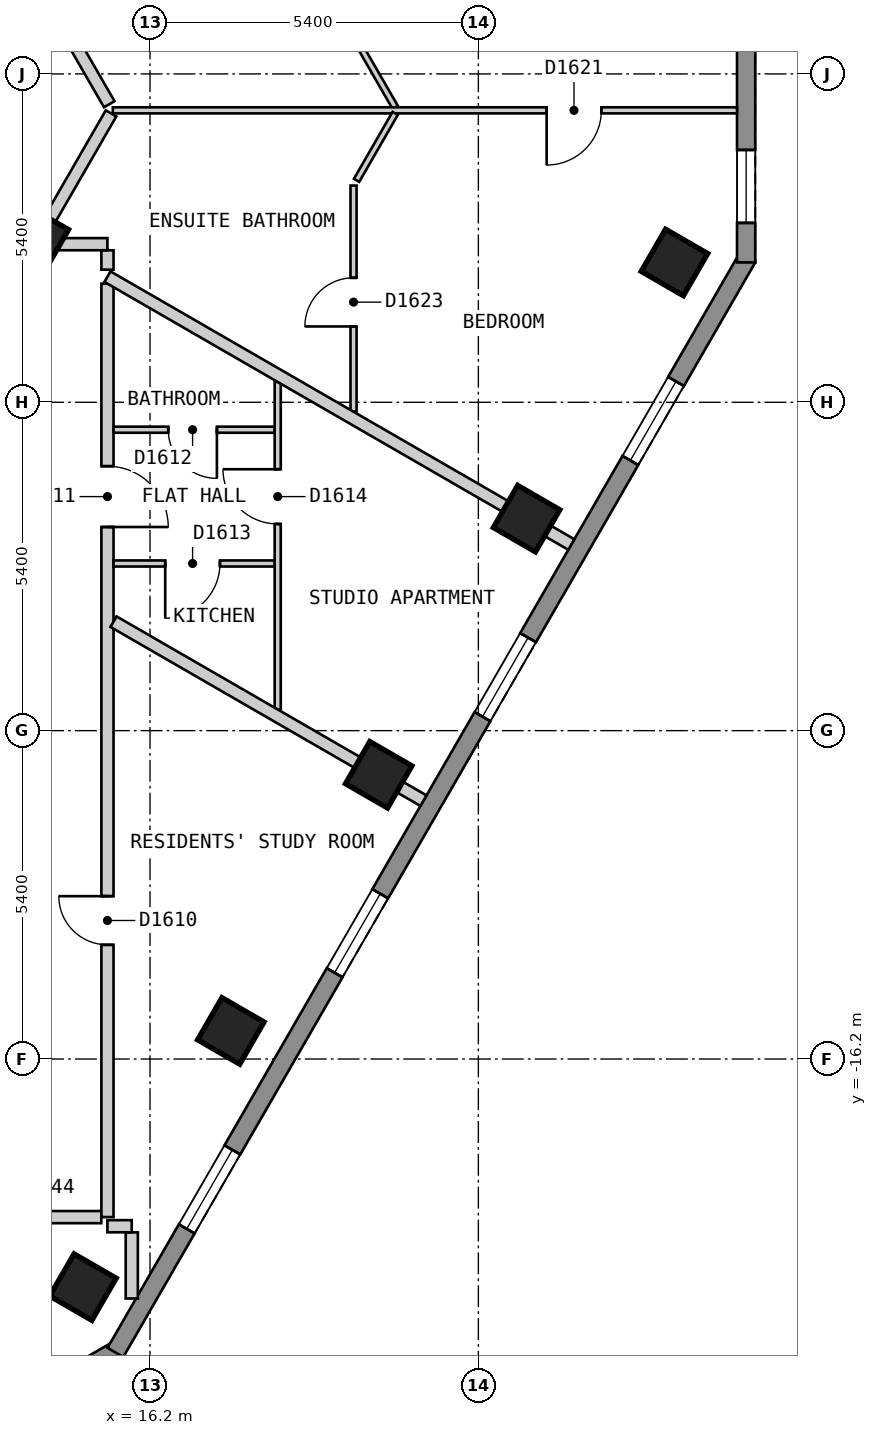
"""IFC4 building model, lengths in metres.
Left out: names, types, materials, properties, quantities, classifications, styles, units other than length and angle.
Written with IfcOpenShell. Run it as: python <this file> out.ifc"""

import sys

from ifc_helpers import new_model, si_unit, direction, frame, frame_2d, origin, origin_2d, place, context, subcontext, project, spatial, polyline, rectangle, outline, extrude, element, fill, save


model = new_model("IFC4")
c1 = context("Model", 3, precision=1e-05, world=origin(), true_north=direction((0.0, 1.0)))
c2 = subcontext(c1, "Body", "Model", "MODEL_VIEW")
j1 = project(units=[si_unit("LENGTHUNIT", "METRE"), si_unit("PLANEANGLEUNIT", "RADIAN")], contexts=[c1])
p1 = place(None, origin())
s1 = spatial("IfcSite", under=j1, at=p1, CompositionType="ELEMENT")
p2 = place(p1, origin())
s2 = spatial("IfcBuilding", under=s1, at=p2, CompositionType="ELEMENT")
p3 = place(p2, frame((0.0, 0.0, 163.2)))
s3 = spatial("IfcBuildingStorey", under=s2, at=p3, CompositionType="ELEMENT", Elevation=163.2)
for number, where, z_axis, x_axis in (
    (1, (15.097, -19.951, 0.0), (0.0, 0.0, 1.0), (0.5, 0.866, 0.0)),
    (2, (17.529, -15.738, 0.0), (0.0, 0.0, 1.0), (0.5, 0.866, 0.0)),
    (3, (19.961, -11.526, 0.0), (0.0, 0.0, 1.0), (0.5, 0.866, 0.0)),
    (4, (22.393, -7.314, 0.0), (0.0, 0.0, 1.0), (0.5, 0.866, 0.0)),
    (5, (24.825, -3.101, 0.0), (0.0, 0.0, 1.0), (0.5, 0.866, 0.0)),
):
    element("IfcColumn", number, at=place(p3, frame(where, z_axis=z_axis, x_axis=x_axis)), inside=s3, PredefinedType="COLUMN", context=c2, shape_type="SweptSolid", body=[
        extrude(rectangle(XDim=0.8, YDim=0.8, at=origin_2d()), origin(), (0.0, 0.0, 1.0), 3.0),
    ])
p4 = place(p3, frame((14.382, -2.689, 0.0), z_axis=(0.0, 0.0, 1.0), x_axis=(0.5, 0.866025403784, 0.0)))
e6 = element("IfcColumn", 6, at=p4, inside=s3, PredefinedType="COLUMN", context=c2, shape_type="SweptSolid", body=[
    extrude(rectangle(XDim=0.7, YDim=0.7, at=origin_2d()), origin(), (0.0, 0.0, 1.0), 3.0),
])
p5 = place(p3, frame((11.356, -23.47, 0.0), z_axis=(0.0, 0.0, 1.0), x_axis=(0.866022959057, 0.500004234368, 0.0)))
e7 = element("IfcWall", 7, at=p5, inside=s3, PredefinedType="SOLIDWALL", context=c2, shape_type="SweptSolid", body=[
    extrude(outline(polyline([(0.0, -0.15), (5.0, -0.15), (4.92, 0.15), (0.08, 0.15), (0.0, -0.15)])), origin(), (0.0, 0.0, 1.0), 2.7),
])
p6 = place(p5, frame((0.65, 0.0, 0.15)))
e8 = element("IfcOpeningElement", 8, at=p6, cuts=e7, PredefinedType="OPENING", context=c2, shape_type="SweptSolid", body=[
    extrude(rectangle(XDim=1.2, YDim=2.1, at=frame_2d((0.6, 1.05))), frame((0.0, 0.16, 0.0), z_axis=(0.0, -1.0, 0.0), x_axis=(1.0, 0.0, 0.0)), (0.0, 0.0, 1.0), 0.32),
])
p7 = place(p3, frame((15.631, -21.025, 0.0), z_axis=(0.0, 0.0, 1.0), x_axis=(0.500018670445, 0.86601462413, 0.0)))
e9 = element("IfcWall", 9, at=p7, inside=s3, PredefinedType="SOLIDWALL", context=c2, shape_type="SweptSolid", body=[
    extrude(outline(polyline([(0.0, -0.15), (20.785, -0.15), (20.705, 0.15), (0.08, 0.15), (0.0, -0.15)])), origin(), (0.0, 0.0, 1.0), 2.7),
])
p8 = place(p7, frame((2.346, 0.0, 0.15)))
e10 = element("IfcOpeningElement", 10, at=p8, cuts=e9, PredefinedType="OPENING", context=c2, shape_type="SweptSolid", body=[
    extrude(rectangle(XDim=1.5, YDim=2.1, at=frame_2d((0.75, 1.05))), frame((0.0, 0.16, 0.0), z_axis=(0.0, -1.0, 0.0), x_axis=(1.0, 0.0, 0.0)), (0.0, 0.0, 1.0), 0.32),
])
p9 = place(p7, frame((7.21, 0.0, 0.15)))
e11 = element("IfcOpeningElement", 11, at=p9, cuts=e9, PredefinedType="OPENING", context=c2, shape_type="SweptSolid", body=[
    extrude(rectangle(XDim=1.5, YDim=2.1, at=frame_2d((0.75, 1.05))), frame((0.0, 0.16, 0.0), z_axis=(0.0, -1.0, 0.0), x_axis=(1.0, 0.0, 0.0)), (0.0, 0.0, 1.0), 0.32),
])
p10 = place(p7, frame((12.073, 0.0, 0.15)))
e12 = element("IfcOpeningElement", 12, at=p10, cuts=e9, PredefinedType="OPENING", context=c2, shape_type="SweptSolid", body=[
    extrude(rectangle(XDim=1.5, YDim=2.1, at=frame_2d((0.75, 1.05))), frame((0.0, 0.16, 0.0), z_axis=(0.0, -1.0, 0.0), x_axis=(1.0, 0.0, 0.0)), (0.0, 0.0, 1.0), 0.32),
])
p11 = place(p7, frame((16.938, 0.0, 0.15)))
e13 = element("IfcOpeningElement", 13, at=p11, cuts=e9, PredefinedType="OPENING", context=c2, shape_type="SweptSolid", body=[
    extrude(rectangle(XDim=1.5, YDim=2.1, at=frame_2d((0.75, 1.05))), frame((0.0, 0.16, 0.0), z_axis=(0.0, -1.0, 0.0), x_axis=(1.0, 0.0, 0.0)), (0.0, 0.0, 1.0), 0.32),
])
p12 = place(p3, frame((26.004, -3.1, 0.0), z_axis=(0.0, 0.0, 1.0), x_axis=(0.0, 1.0, 0.0)))
e14 = element("IfcWall", 14, at=p12, inside=s3, PredefinedType="SOLIDWALL", context=c2, shape_type="SweptSolid", body=[
    extrude(outline(polyline([(0.0, -0.15), (5.0, -0.15), (4.92, 0.15), (0.08, 0.15), (0.0, -0.15)])), origin(), (0.0, 0.0, 1.0), 2.7),
])
p13 = place(p12, frame((0.65, 0.0, 0.15)))
e15 = element("IfcOpeningElement", 15, at=p13, cuts=e14, PredefinedType="OPENING", context=c2, shape_type="SweptSolid", body=[
    extrude(rectangle(XDim=1.2, YDim=2.1, at=frame_2d((0.6, 1.05))), frame((0.0, 0.16, 0.0), z_axis=(0.0, -1.0, 0.0), x_axis=(1.0, 0.0, 0.0)), (0.0, 0.0, 1.0), 0.32),
])
p14 = place(p3, frame((10.739, 7.8, 0.0), z_axis=(0.0, 0.0, 1.0), x_axis=(0.499964311759, -0.86604600742, 0.0)))
e16 = element("IfcWall", 16, at=p14, inside=s3, PredefinedType="PARTITIONING", context=c2, shape_type="SweptSolid", body=[
    extrude(rectangle(XDim=9.583, YDim=0.2, at=frame_2d((4.792, 0.0))), origin(), (0.0, 0.0, 1.0), 2.7),
])
p15 = place(p3, frame((15.5, -2.901, 0.0), z_axis=(0.0, 0.0, 1.0), x_axis=(0.0, -1.0, 0.0)))
e17 = element("IfcWall", 17, at=p15, inside=s3, PredefinedType="PARTITIONING", context=c2, shape_type="SweptSolid", body=[
    extrude(rectangle(XDim=0.318, YDim=0.2, at=frame_2d((0.159, 0.0))), origin(), (0.0, 0.0, 1.0), 2.7),
])
p16 = place(p3, frame((13.3, -18.8, 0.0), z_axis=(0.0, 0.0, 1.0), x_axis=(1.0, 0.0, 0.0)))
e18 = element("IfcWall", 18, at=p16, inside=s3, PredefinedType="PARTITIONING", context=c2, shape_type="SweptSolid", body=[
    extrude(rectangle(XDim=2.099, YDim=0.2, at=frame_2d((1.049, 0.0))), origin(), (0.0, 0.0, 1.0), 2.7),
])
p17 = place(p16, frame((0.2, 0.0, 0.0)))
e19 = element("IfcOpeningElement", 19, at=p17, cuts=e18, PredefinedType="OPENING", context=c2, shape_type="SweptSolid", body=[
    extrude(rectangle(XDim=1.0, YDim=2.1, at=frame_2d((0.5, 1.05))), frame((0.0, 0.11, 0.0), z_axis=(0.0, -1.0, 0.0), x_axis=(1.0, 0.0, 0.0)), (0.0, 0.0, 1.0), 0.22),
])
p18 = place(p3, frame((14.433, -2.8, 0.0), z_axis=(0.0, 0.0, 1.0), x_axis=(1.0, 0.0, 0.0)))
e20 = element("IfcWall", 20, at=p18, inside=s3, PredefinedType="PARTITIONING", context=c2, shape_type="SweptSolid", body=[
    extrude(rectangle(XDim=1.066, YDim=0.2, at=frame_2d((0.533, 0.0))), origin(), (0.0, 0.0, 1.0), 2.7),
])
p19 = place(p3, frame((14.318, -2.8, 0.0), z_axis=(0.0, 0.0, 1.0), x_axis=(0.49970259524, 0.866197042428, 0.0)))
e21 = element("IfcWall", 21, at=p19, inside=s3, PredefinedType="PARTITIONING", context=c2, shape_type="SweptSolid", body=[
    extrude(rectangle(XDim=2.483, YDim=0.2, at=frame_2d((1.242, 0.0))), origin(), (0.0, 0.0, 1.0), 2.7),
])
p20 = place(p3, frame((15.5, -18.799, 0.0), z_axis=(0.0, 0.0, 1.0), x_axis=(0.0, 1.0, 0.0)))
e22 = element("IfcWall", 22, at=p20, inside=s3, PredefinedType="PARTITIONING", context=c2, shape_type="SweptSolid", body=[
    extrude(rectangle(XDim=15.349, YDim=0.2, at=frame_2d((7.675, 0.0))), origin(), (0.0, 0.0, 1.0), 2.7),
])
p21 = place(p20, frame((4.477, 0.0, 0.0)))
e23 = element("IfcOpeningElement", 23, at=p21, cuts=e22, PredefinedType="OPENING", context=c2, shape_type="SweptSolid", body=[
    extrude(rectangle(XDim=0.8, YDim=2.1, at=frame_2d((0.4, 1.05))), frame((0.0, 0.11, 0.0), z_axis=(0.0, -1.0, 0.0), x_axis=(1.0, 0.0, 0.0)), (0.0, 0.0, 1.0), 0.22),
])
p22 = place(p20, frame((11.348, 0.0, 0.0)))
e24 = element("IfcOpeningElement", 24, at=p22, cuts=e22, PredefinedType="OPENING", context=c2, shape_type="SweptSolid", body=[
    extrude(rectangle(XDim=1.0, YDim=2.1, at=frame_2d((0.5, 1.05))), frame((0.0, 0.11, 0.0), z_axis=(0.0, -1.0, 0.0), x_axis=(1.0, 0.0, 0.0)), (0.0, 0.0, 1.0), 0.22),
])
p23 = place(p3, frame((19.597, 0.551, 0.0), z_axis=(0.0, 0.0, 1.0), x_axis=(0.499922110319, -0.866070368743, 0.0)))
e25 = element("IfcWall", 25, at=p23, inside=s3, PredefinedType="PARTITIONING", context=c2, shape_type="SweptSolid", body=[
    extrude(rectangle(XDim=1.27, YDim=0.1, at=frame_2d((0.635, 0.0))), origin(), (0.0, 0.0, 1.0), 2.7),
])
p24 = place(p3, frame((15.6, -5.851, 0.0), z_axis=(0.0, 0.0, 1.0), x_axis=(1.0, 0.0, 0.0)))
e26 = element("IfcWall", 26, at=p24, inside=s3, PredefinedType="PARTITIONING", context=c2, shape_type="SweptSolid", body=[
    extrude(rectangle(XDim=2.65, YDim=0.1, at=frame_2d((1.325, 0.0))), origin(), (0.0, 0.0, 1.0), 2.7),
])
p25 = place(p24, frame((0.9, 0.0, 0.0)))
e27 = element("IfcOpeningElement", 27, at=p25, cuts=e26, PredefinedType="OPENING", context=c2, shape_type="SweptSolid", body=[
    extrude(rectangle(XDim=0.8, YDim=2.1, at=frame_2d((0.4, 1.05))), frame((0.0, 0.06, 0.0), z_axis=(0.0, -1.0, 0.0), x_axis=(1.0, 0.0, 0.0)), (0.0, 0.0, 1.0), 0.12),
])
p26 = place(p3, frame((15.588, -0.599, 0.0), z_axis=(0.0, 0.0, 1.0), x_axis=(1.0, 0.0, 0.0)))
e28 = element("IfcWall", 28, at=p26, inside=s3, PredefinedType="PARTITIONING", context=c2, shape_type="SweptSolid", body=[
    extrude(rectangle(XDim=10.266, YDim=0.1, at=frame_2d((5.133, 0.0))), origin(), (0.0, 0.0, 1.0), 2.7),
])
p27 = place(p26, frame((7.135, 0.0, 0.0)))
e29 = element("IfcOpeningElement", 29, at=p27, cuts=e28, PredefinedType="OPENING", context=c2, shape_type="SweptSolid", body=[
    extrude(rectangle(XDim=0.9, YDim=2.1, at=frame_2d((0.45, 1.05))), frame((0.0, 0.06, 0.0), z_axis=(0.0, -1.0, 0.0), x_axis=(1.0, 0.0, 0.0)), (0.0, 0.0, 1.0), 0.12),
])
p28 = place(p3, frame((15.6, -8.051, 0.0), z_axis=(0.0, 0.0, 1.0), x_axis=(1.0, 0.0, 0.0)))
e30 = element("IfcWall", 30, at=p28, inside=s3, PredefinedType="PARTITIONING", context=c2, shape_type="SweptSolid", body=[
    extrude(rectangle(XDim=2.65, YDim=0.1, at=frame_2d((1.325, 0.0))), origin(), (0.0, 0.0, 1.0), 2.7),
])
p29 = place(p28, frame((0.85, 0.0, 0.0)))
e31 = element("IfcOpeningElement", 31, at=p29, cuts=e30, PredefinedType="OPENING", context=c2, shape_type="SweptSolid", body=[
    extrude(rectangle(XDim=0.9, YDim=2.1, at=frame_2d((0.45, 1.05))), frame((0.0, 0.06, 0.0), z_axis=(0.0, -1.0, 0.0), x_axis=(1.0, 0.0, 0.0)), (0.0, 0.0, 1.0), 0.12),
])
p30 = place(p3, frame((19.597, -1.75, 0.0), z_axis=(0.0, 0.0, 1.0), x_axis=(0.499589422776, 0.866262320923, 0.0)))
e32 = element("IfcWall", 32, at=p30, inside=s3, PredefinedType="PARTITIONING", context=c2, shape_type="SweptSolid", body=[
    extrude(rectangle(XDim=1.271, YDim=0.1, at=frame_2d((0.635, 0.0))), origin(), (0.0, 0.0, 1.0), 2.7),
])
p31 = place(p3, frame((18.3, -10.452, 0.0), z_axis=(0.0, 0.0, 1.0), x_axis=(0.0, 1.0, 0.0)))
e33 = element("IfcWall", 33, at=p31, inside=s3, PredefinedType="PARTITIONING", context=c2, shape_type="SweptSolid", body=[
    extrude(rectangle(XDim=5.386, YDim=0.1, at=frame_2d((2.693, 0.0))), origin(), (0.0, 0.0, 1.0), 2.7),
])
p32 = place(p31, frame((3.051, 0.0, 0.0)))
e34 = element("IfcOpeningElement", 34, at=p32, cuts=e33, PredefinedType="OPENING", context=c2, shape_type="SweptSolid", body=[
    extrude(rectangle(XDim=0.9, YDim=2.1, at=frame_2d((0.45, 1.05))), frame((0.0, 0.06, 0.0), z_axis=(0.0, -1.0, 0.0), x_axis=(1.0, 0.0, 0.0)), (0.0, 0.0, 1.0), 0.12),
])
p33 = place(p3, frame((19.547, -5.555, 0.0), z_axis=(0.0, 0.0, 1.0), x_axis=(0.0, 1.0, 0.0)))
e35 = element("IfcWall", 35, at=p33, inside=s3, PredefinedType="PARTITIONING", context=c2, shape_type="SweptSolid", body=[
    extrude(rectangle(XDim=3.719, YDim=0.1, at=frame_2d((1.859, 0.0))), origin(), (0.0, 0.0, 1.0), 2.7),
])
p34 = place(p33, frame((1.402, 0.0, 0.0)))
e36 = element("IfcOpeningElement", 36, at=p34, cuts=e35, PredefinedType="OPENING", context=c2, shape_type="SweptSolid", body=[
    extrude(rectangle(XDim=0.8, YDim=2.1, at=frame_2d((0.4, 1.05))), frame((0.0, 0.06, 0.0), z_axis=(0.0, -1.0, 0.0), x_axis=(1.0, 0.0, 0.0)), (0.0, 0.0, 1.0), 0.12),
])
p35 = place(p3, frame((15.9, -19.051, 0.0), z_axis=(0.0, 0.0, 1.0), x_axis=(0.0, -1.0, 0.0)))
e37 = element("IfcWall", 37, at=p35, inside=s3, PredefinedType="PARTITIONING", context=c2, shape_type="SweptSolid", body=[
    extrude(rectangle(XDim=1.087, YDim=0.2, at=frame_2d((0.543, 0.0))), origin(), (0.0, 0.0, 1.0), 2.7),
])
p36 = place(p3, frame((15.6, -9.008, 0.0), z_axis=(0.0, 0.0, 1.0), x_axis=(0.866013576751, -0.500020484464, 0.0)))
e38 = element("IfcWall", 38, at=p36, inside=s3, PredefinedType="PARTITIONING", context=c2, shape_type="SweptSolid", body=[
    extrude(rectangle(XDim=5.885, YDim=0.2, at=frame_2d((2.943, 0.0))), origin(), (0.0, 0.0, 1.0), 2.7),
])
p37 = place(p3, frame((15.5, -3.334, 0.0), z_axis=(0.0, 0.0, 1.0), x_axis=(0.866001896501, -0.5000407136, 0.0)))
e39 = element("IfcWall", 39, at=p37, inside=s3, PredefinedType="PARTITIONING", context=c2, shape_type="SweptSolid", body=[
    extrude(rectangle(XDim=8.809, YDim=0.2, at=frame_2d((4.405, 0.0))), origin(), (0.0, 0.0, 1.0), 2.7),
])
p38 = place(p3, frame((15.499, -18.95, 0.0), z_axis=(0.0, 0.0, 1.0), x_axis=(1.0, 0.0, 0.0)))
e40 = element("IfcWall", 40, at=p38, inside=s3, PredefinedType="PARTITIONING", context=c2, shape_type="SweptSolid", body=[
    extrude(rectangle(XDim=0.4, YDim=0.2, at=frame_2d((0.2, 0.0))), origin(), (0.0, 0.0, 1.0), 2.7),
])
p39 = place(p8, origin())
e41 = element("IfcWindow", 41, at=p39, inside=s3, PartitioningType="SINGLE_PANEL", PredefinedType="WINDOW", context=c2, shape_type="SweptSolid", body=[
    extrude(rectangle(XDim=1.5, YDim=2.1, at=frame_2d((0.75, 1.05))), frame((0.0, 0.03, 0.0), z_axis=(0.0, -1.0, 0.0), x_axis=(1.0, 0.0, 0.0)), (0.0, 0.0, 1.0), 0.06),
])
fill(e10, e41)
p40 = place(p9, origin())
e42 = element("IfcWindow", 42, at=p40, inside=s3, PartitioningType="SINGLE_PANEL", PredefinedType="WINDOW", context=c2, shape_type="SweptSolid", body=[
    extrude(rectangle(XDim=1.5, YDim=2.1, at=frame_2d((0.75, 1.05))), frame((0.0, 0.03, 0.0), z_axis=(0.0, -1.0, 0.0), x_axis=(1.0, 0.0, 0.0)), (0.0, 0.0, 1.0), 0.06),
])
fill(e11, e42)
p41 = place(p10, origin())
e43 = element("IfcWindow", 43, at=p41, inside=s3, PartitioningType="SINGLE_PANEL", PredefinedType="WINDOW", context=c2, shape_type="SweptSolid", body=[
    extrude(rectangle(XDim=1.5, YDim=2.1, at=frame_2d((0.75, 1.05))), frame((0.0, 0.03, 0.0), z_axis=(0.0, -1.0, 0.0), x_axis=(1.0, 0.0, 0.0)), (0.0, 0.0, 1.0), 0.06),
])
fill(e12, e43)
p42 = place(p11, origin())
e44 = element("IfcWindow", 44, at=p42, inside=s3, PartitioningType="SINGLE_PANEL", PredefinedType="WINDOW", context=c2, shape_type="SweptSolid", body=[
    extrude(rectangle(XDim=1.5, YDim=2.1, at=frame_2d((0.75, 1.05))), frame((0.0, 0.03, 0.0), z_axis=(0.0, -1.0, 0.0), x_axis=(1.0, 0.0, 0.0)), (0.0, 0.0, 1.0), 0.06),
])
fill(e13, e44)
p43 = place(p13, origin())
e45 = element("IfcWindow", 45, at=p43, inside=s3, PartitioningType="SINGLE_PANEL", PredefinedType="WINDOW", context=c2, shape_type="SweptSolid", body=[
    extrude(rectangle(XDim=1.2, YDim=2.1, at=frame_2d((0.6, 1.05))), frame((0.0, 0.03, 0.0), z_axis=(0.0, -1.0, 0.0), x_axis=(1.0, 0.0, 0.0)), (0.0, 0.0, 1.0), 0.06),
])
fill(e15, e45)
p44 = place(p21, origin())
e46 = element("IfcDoor", 46, at=p44, inside=s3, OperationType="SINGLE_SWING_RIGHT", PredefinedType="DOOR", context=c2, shape_type="SweptSolid", body=[
    extrude(rectangle(XDim=0.8, YDim=2.1, at=frame_2d((0.4, 1.05))), frame((0.0, 0.025, 0.0), z_axis=(0.0, -1.0, 0.0), x_axis=(1.0, 0.0, 0.0)), (0.0, 0.0, 1.0), 0.05),
])
fill(e23, e46)
p45 = place(p22, origin())
e47 = element("IfcDoor", 47, at=p45, inside=s3, OperationType="SINGLE_SWING_LEFT", PredefinedType="DOOR", context=c2, shape_type="SweptSolid", body=[
    extrude(rectangle(XDim=1.0, YDim=2.1, at=frame_2d((0.5, 1.05))), frame((0.0, 0.025, 0.0), z_axis=(0.0, -1.0, 0.0), x_axis=(1.0, 0.0, 0.0)), (0.0, 0.0, 1.0), 0.05),
])
fill(e24, e47)
p46 = place(p25, origin())
e48 = element("IfcDoor", 48, at=p46, inside=s3, OperationType="SINGLE_SWING_RIGHT", PredefinedType="DOOR", context=c2, shape_type="SweptSolid", body=[
    extrude(rectangle(XDim=0.8, YDim=2.1, at=frame_2d((0.4, 1.05))), frame((0.0, 0.025, 0.0), z_axis=(0.0, -1.0, 0.0), x_axis=(1.0, 0.0, 0.0)), (0.0, 0.0, 1.0), 0.05),
])
fill(e27, e48)
p47 = place(p29, origin())
e49 = element("IfcDoor", 49, at=p47, inside=s3, OperationType="SINGLE_SWING_LEFT", PredefinedType="DOOR", context=c2, shape_type="SweptSolid", body=[
    extrude(rectangle(XDim=0.9, YDim=2.1, at=frame_2d((0.45, 1.05))), frame((0.0, 0.025, 0.0), z_axis=(0.0, -1.0, 0.0), x_axis=(1.0, 0.0, 0.0)), (0.0, 0.0, 1.0), 0.05),
])
fill(e31, e49)
p48 = place(p32, origin())
e50 = element("IfcDoor", 50, at=p48, inside=s3, OperationType="SINGLE_SWING_RIGHT", PredefinedType="DOOR", context=c2, shape_type="SweptSolid", body=[
    extrude(rectangle(XDim=0.9, YDim=2.1, at=frame_2d((0.45, 1.05))), frame((0.0, 0.025, 0.0), z_axis=(0.0, -1.0, 0.0), x_axis=(1.0, 0.0, 0.0)), (0.0, 0.0, 1.0), 0.05),
])
fill(e34, e50)
p49 = place(p27, origin())
e51 = element("IfcDoor", 51, at=p49, inside=s3, OperationType="SINGLE_SWING_LEFT", PredefinedType="DOOR", context=c2, shape_type="SweptSolid", body=[
    extrude(rectangle(XDim=0.9, YDim=2.1, at=frame_2d((0.45, 1.05))), frame((0.0, 0.025, 0.0), z_axis=(0.0, -1.0, 0.0), x_axis=(1.0, 0.0, 0.0)), (0.0, 0.0, 1.0), 0.05),
])
fill(e29, e51)
p50 = place(p34, origin())
e52 = element("IfcDoor", 52, at=p50, inside=s3, OperationType="SINGLE_SWING_LEFT", PredefinedType="DOOR", context=c2, shape_type="SweptSolid", body=[
    extrude(rectangle(XDim=0.8, YDim=2.1, at=frame_2d((0.4, 1.05))), frame((0.0, 0.025, 0.0), z_axis=(0.0, -1.0, 0.0), x_axis=(1.0, 0.0, 0.0)), (0.0, 0.0, 1.0), 0.05),
])
fill(e36, e52)
save(model, sys.argv[1])
